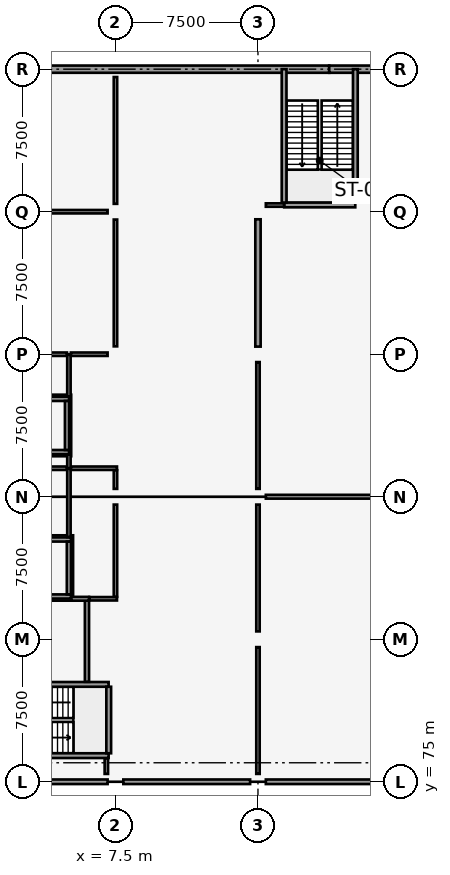
"""IFC4 building model, lengths in metres.
Left out: names, types, materials, properties, quantities, classifications, styles, units other than length and angle.
Written with IfcOpenShell. Run it as: python <this file> out.ifc"""

import sys

from ifc_helpers import new_model, si_unit, direction, frame, frame_2d, origin, origin_2d, place, context, subcontext, project, spatial, rectangle, extrude, element, fill, save


model = new_model("IFC4")
c1 = context("Model", 3, precision=1e-05, world=origin(), true_north=direction((0.0, 1.0)))
c2 = subcontext(c1, "Body", "Model", "MODEL_VIEW")
j1 = project(units=[si_unit("LENGTHUNIT", "METRE"), si_unit("PLANEANGLEUNIT", "RADIAN")], contexts=[c1])
p1 = place(None, origin())
s1 = spatial("IfcSite", under=j1, at=p1, CompositionType="ELEMENT")
p2 = place(p1, origin())
s2 = spatial("IfcBuilding", under=s1, at=p2, CompositionType="ELEMENT")
p3 = place(p2, frame((0.0, 0.0, -4.8)))
s3 = spatial("IfcBuildingStorey", under=s2, at=p3, CompositionType="ELEMENT", Elevation=-4.8)
for number, where, z_axis, x_axis in (
    (1, (7.5, 75.0, 0.0), (0.0, 0.0, 1.0), (1.0, 0.0, 0.0)),
    (2, (7.5, 82.5, 0.0), (0.0, 0.0, 1.0), (1.0, 0.0, 0.0)),
    (3, (7.5, 90.0, 0.0), (0.0, 0.0, 1.0), (1.0, 0.0, 0.0)),
    (4, (7.5, 97.5, 0.0), (0.0, 0.0, 1.0), (1.0, 0.0, 0.0)),
    (5, (7.5, 105.0, 0.0), (0.0, 0.0, 1.0), (1.0, 0.0, 0.0)),
    (6, (7.5, 112.5, 0.0), (0.0, 0.0, 1.0), (1.0, 0.0, 0.0)),
    (7, (15.0, 75.0, 0.0), (0.0, 0.0, 1.0), (1.0, 0.0, 0.0)),
    (8, (15.0, 82.5, 0.0), (0.0, 0.0, 1.0), (1.0, 0.0, 0.0)),
    (9, (15.0, 90.0, 0.0), (0.0, 0.0, 1.0), (1.0, 0.0, 0.0)),
    (10, (15.0, 97.5, 0.0), (0.0, 0.0, 1.0), (1.0, 0.0, 0.0)),
    (11, (15.0, 105.0, 0.0), (0.0, 0.0, 1.0), (1.0, 0.0, 0.0)),
    (12, (15.0, 112.5, 0.0), (0.0, 0.0, 1.0), (1.0, 0.0, 0.0)),
):
    element("IfcColumn", number, at=place(p3, frame(where, z_axis=z_axis, x_axis=x_axis)), inside=s3, PredefinedType="COLUMN", context=c2, shape_type="SweptSolid", body=[
        extrude(rectangle(XDim=0.8, YDim=0.8, at=origin_2d()), origin(), (0.0, 0.0, 1.0), 4.8),
    ])
p4 = place(p3, frame((0.415, 112.5, 0.0), z_axis=(0.0, 0.0, 1.0), x_axis=(1.0, 0.0, 0.0)))
e13 = element("IfcWall", 13, at=p4, inside=s3, PredefinedType="USERDEFINED", context=c2, shape_type="SweptSolid", body=[
    extrude(rectangle(XDim=18.335, YDim=0.38, at=frame_2d((9.167, 0.0))), origin(), (0.0, 0.0, 1.0), 4.5),
])
p5 = place(p3, frame((18.75, 112.5, 0.0), z_axis=(0.0, 0.0, 1.0), x_axis=(1.0, 0.0, 0.0)))
e14 = element("IfcWall", 14, at=p5, inside=s3, PredefinedType="USERDEFINED", context=c2, shape_type="SweptSolid", body=[
    extrude(rectangle(XDim=18.345, YDim=0.38, at=frame_2d((9.172, 0.0))), origin(), (0.0, 0.0, 1.0), 4.5),
])
p6 = place(p3, frame((15.0, 97.9, 0.0), z_axis=(0.0, 0.0, 1.0), x_axis=(0.0, 1.0, 0.0)))
e15 = element("IfcWall", 15, at=p6, inside=s3, PredefinedType="SHEAR", context=c2, shape_type="SweptSolid", body=[
    extrude(rectangle(XDim=6.7, YDim=0.28, at=frame_2d((3.35, 0.0))), origin(), (0.0, 0.0, 1.0), 4.5),
])
p7 = place(p3, frame((-0.12, 76.375, 0.0), z_axis=(0.0, 0.0, 1.0), x_axis=(1.0, 0.0, 0.0)))
e16 = element("IfcWall", 16, at=p7, inside=s3, PredefinedType="SOLIDWALL", context=c2, shape_type="SweptSolid", body=[
    extrude(rectangle(XDim=7.26, YDim=0.25, at=frame_2d((3.63, 0.0))), origin(), (0.0, 0.0, 1.0), 4.5),
])
p8 = place(p3, frame((-0.12, 80.125, 0.0), z_axis=(0.0, 0.0, 1.0), x_axis=(1.0, 0.0, 0.0)))
e17 = element("IfcWall", 17, at=p8, inside=s3, PredefinedType="SOLIDWALL", context=c2, shape_type="SweptSolid", body=[
    extrude(rectangle(XDim=7.26, YDim=0.25, at=frame_2d((3.63, 0.0))), origin(), (0.0, 0.0, 1.0), 4.5),
])
p9 = place(p8, frame((0.45, 0.0, 0.0)))
e18 = element("IfcOpeningElement", 18, at=p9, cuts=e17, PredefinedType="OPENING", context=c2, shape_type="SweptSolid", body=[
    extrude(rectangle(XDim=1.1, YDim=2.15, at=frame_2d((0.55, 1.075))), frame((0.0, 0.135, 0.0), z_axis=(0.0, -1.0, 0.0), x_axis=(1.0, 0.0, 0.0)), (0.0, 0.0, 1.0), 0.27),
])
p10 = place(p3, frame((7.145, 76.5, 0.0), z_axis=(0.0, 0.0, 1.0), x_axis=(0.0, 1.0, 0.0)))
e19 = element("IfcWall", 19, at=p10, inside=s3, PredefinedType="SOLIDWALL", context=c2, shape_type="SweptSolid", body=[
    extrude(rectangle(XDim=3.5, YDim=0.25, at=frame_2d((1.75, 0.0))), origin(), (0.0, 0.0, 1.0), 4.5),
])
p11 = place(p3, frame((16.38, 105.355, 0.0), z_axis=(0.0, 0.0, 1.0), x_axis=(1.0, 0.0, 0.0)))
e20 = element("IfcWall", 20, at=p11, inside=s3, PredefinedType="SOLIDWALL", context=c2, shape_type="SweptSolid", body=[
    extrude(rectangle(XDim=3.74, YDim=0.25, at=frame_2d((1.87, 0.0))), origin(), (0.0, 0.0, 1.0), 4.5),
])
p12 = place(p3, frame((16.375, 105.48, 0.0), z_axis=(0.0, 0.0, 1.0), x_axis=(0.0, 1.0, 0.0)))
e21 = element("IfcWall", 21, at=p12, inside=s3, PredefinedType="SOLIDWALL", context=c2, shape_type="SweptSolid", body=[
    extrude(rectangle(XDim=7.02, YDim=0.25, at=frame_2d((3.51, 0.0))), origin(), (0.0, 0.0, 1.0), 4.5),
])
p13 = place(p12, frame((5.47, 0.0, 0.0)))
e22 = element("IfcOpeningElement", 22, at=p13, cuts=e21, PredefinedType="OPENING", context=c2, shape_type="SweptSolid", body=[
    extrude(rectangle(XDim=1.1, YDim=2.15, at=frame_2d((0.55, 1.075))), frame((0.0, 0.135, 0.0), z_axis=(0.0, -1.0, 0.0), x_axis=(1.0, 0.0, 0.0)), (0.0, 0.0, 1.0), 0.27),
])
p14 = place(p3, frame((20.125, 105.48, 0.0), z_axis=(0.0, 0.0, 1.0), x_axis=(0.0, 1.0, 0.0)))
e23 = element("IfcWall", 23, at=p14, inside=s3, PredefinedType="SOLIDWALL", context=c2, shape_type="SweptSolid", body=[
    extrude(rectangle(XDim=7.02, YDim=0.25, at=frame_2d((3.51, 0.0))), origin(), (0.0, 0.0, 1.0), 4.5),
])
for number, where, z_axis, x_axis in (
    (24, (2.44, 92.35, 0.0), (0.0, 0.0, 1.0), (1.0, 0.0, 0.0)),
    (25, (2.44, 95.15, 0.0), (0.0, 0.0, 1.0), (1.0, 0.0, 0.0)),
):
    element("IfcWall", number, at=place(p3, frame(where, z_axis=z_axis, x_axis=x_axis)), inside=s3, PredefinedType="SOLIDWALL", context=c2, shape_type="SweptSolid", body=[
        extrude(rectangle(XDim=2.62, YDim=0.22, at=frame_2d((1.31, 0.0))), origin(), (0.0, 0.0, 1.0), 4.5),
    ])
p15 = place(p3, frame((4.95, 92.46, 0.0), z_axis=(0.0, 0.0, 1.0), x_axis=(0.0, 1.0, 0.0)))
e26 = element("IfcWall", 26, at=p15, inside=s3, PredefinedType="SOLIDWALL", context=c2, shape_type="SweptSolid", body=[
    extrude(rectangle(XDim=2.58, YDim=0.22, at=frame_2d((1.29, 0.0))), origin(), (0.0, 0.0, 1.0), 4.5),
])
p16 = place(p15, frame((0.79, 0.0, 0.0)))
e27 = element("IfcOpeningElement", 27, at=p16, cuts=e26, PredefinedType="OPENING", context=c2, shape_type="SweptSolid", body=[
    extrude(rectangle(XDim=1.0, YDim=2.15, at=frame_2d((0.5, 1.075))), frame((0.0, 0.12, 0.0), z_axis=(0.0, -1.0, 0.0), x_axis=(1.0, 0.0, 0.0)), (0.0, 0.0, 1.0), 0.24),
])
p17 = place(p3, frame((2.34, 84.75, 0.0), z_axis=(0.0, 0.0, 1.0), x_axis=(1.0, 0.0, 0.0)))
e28 = element("IfcWall", 28, at=p17, inside=s3, PredefinedType="SOLIDWALL", context=c2, shape_type="SweptSolid", body=[
    extrude(rectangle(XDim=2.82, YDim=0.22, at=frame_2d((1.41, 0.0))), origin(), (0.0, 0.0, 1.0), 4.5),
])
p18 = place(p17, frame((0.86, 0.0, 0.0)))
e29 = element("IfcOpeningElement", 29, at=p18, cuts=e28, PredefinedType="OPENING", context=c2, shape_type="SweptSolid", body=[
    extrude(rectangle(XDim=1.1, YDim=2.15, at=frame_2d((0.55, 1.075))), frame((0.0, 0.12, 0.0), z_axis=(0.0, -1.0, 0.0), x_axis=(1.0, 0.0, 0.0)), (0.0, 0.0, 1.0), 0.24),
])
p19 = place(p3, frame((2.34, 87.75, 0.0), z_axis=(0.0, 0.0, 1.0), x_axis=(1.0, 0.0, 0.0)))
e30 = element("IfcWall", 30, at=p19, inside=s3, PredefinedType="SOLIDWALL", context=c2, shape_type="SweptSolid", body=[
    extrude(rectangle(XDim=2.82, YDim=0.22, at=frame_2d((1.41, 0.0))), origin(), (0.0, 0.0, 1.0), 4.5),
])
p20 = place(p3, frame((5.05, 84.86, 0.0), z_axis=(0.0, 0.0, 1.0), x_axis=(0.0, 1.0, 0.0)))
e31 = element("IfcWall", 31, at=p20, inside=s3, PredefinedType="SOLIDWALL", context=c2, shape_type="SweptSolid", body=[
    extrude(rectangle(XDim=2.78, YDim=0.22, at=frame_2d((1.39, 0.0))), origin(), (0.0, 0.0, 1.0), 4.5),
])
p21 = place(p3, frame((6.0, 80.26, 0.0), z_axis=(0.0, 0.0, 1.0), x_axis=(0.0, 1.0, 0.0)))
e32 = element("IfcWall", 32, at=p21, inside=s3, PredefinedType="SOLIDWALL", context=c2, shape_type="SweptSolid", body=[
    extrude(rectangle(XDim=4.37, YDim=0.22, at=frame_2d((2.185, 0.0))), origin(), (0.0, 0.0, 1.0), 4.5),
])
p22 = place(p21, frame((0.45, 0.0, 0.0)))
e33 = element("IfcOpeningElement", 33, at=p22, cuts=e32, PredefinedType="OPENING", context=c2, shape_type="SweptSolid", body=[
    extrude(rectangle(XDim=1.1, YDim=2.15, at=frame_2d((0.55, 1.075))), frame((0.0, 0.12, 0.0), z_axis=(0.0, -1.0, 0.0), x_axis=(1.0, 0.0, 0.0)), (0.0, 0.0, 1.0), 0.24),
])
p23 = place(p3, frame((5.175, 84.63, 0.0), z_axis=(0.0, 0.0, 1.0), x_axis=(1.0, 0.0, 0.0)))
e34 = element("IfcWall", 34, at=p23, inside=s3, PredefinedType="PARTITIONING", context=c2, shape_type="SweptSolid", body=[
    extrude(rectangle(XDim=0.935, YDim=0.2, at=frame_2d((0.468, 0.0))), origin(), (0.0, 0.0, 1.0), 4.48),
])
for number, where, z_axis, x_axis in (
    (35, (0.414, 75.0, 0.0), (0.0, 0.0, 1.0), (1.0, 0.0, 0.0)),
    (36, (7.914, 75.0, 0.0), (0.0, 0.0, 1.0), (1.0, 0.0, 0.0)),
    (37, (15.414, 75.0, 0.0), (0.0, 0.0, 1.0), (1.0, 0.0, 0.0)),
):
    element("IfcWall", number, at=place(p3, frame(where, z_axis=z_axis, x_axis=x_axis)), inside=s3, PredefinedType="PARTITIONING", context=c2, shape_type="SweptSolid", body=[
        extrude(rectangle(XDim=6.672, YDim=0.24, at=frame_2d((3.336, 0.0))), origin(), (0.0, 0.0, 1.0), 3.82),
    ])
p24 = place(p3, frame((7.02, 75.414, 0.0), z_axis=(0.0, 0.0, 1.0), x_axis=(0.0, 1.0, 0.0)))
e38 = element("IfcWall", 38, at=p24, inside=s3, PredefinedType="PARTITIONING", context=c2, shape_type="SweptSolid", body=[
    extrude(rectangle(XDim=0.822, YDim=0.18, at=frame_2d((0.411, 0.0))), origin(), (0.0, 0.0, 1.0), 3.82),
])
p25 = place(p3, frame((5.05, 87.874, 0.0), z_axis=(0.0, 0.0, 1.0), x_axis=(0.0, 1.0, 0.0)))
e39 = element("IfcWall", 39, at=p25, inside=s3, PredefinedType="PARTITIONING", context=c2, shape_type="SweptSolid", body=[
    extrude(rectangle(XDim=3.626, YDim=0.18, at=frame_2d((1.813, 0.0))), origin(), (0.0, 0.0, 1.0), 3.57),
])
p26 = place(p3, frame((6.124, 84.63, 0.0), z_axis=(0.0, 0.0, 1.0), x_axis=(1.0, 0.0, 0.0)))
e40 = element("IfcWall", 40, at=p26, inside=s3, PredefinedType="PARTITIONING", context=c2, shape_type="SweptSolid", body=[
    extrude(rectangle(XDim=1.456, YDim=0.18, at=frame_2d((0.728, 0.0))), origin(), (0.0, 0.0, 1.0), 3.87),
])
p27 = place(p3, frame((0.239, 91.5, 0.0), z_axis=(0.0, 0.0, 1.0), x_axis=(1.0, 0.0, 0.0)))
e41 = element("IfcWall", 41, at=p27, inside=s3, PredefinedType="PARTITIONING", context=c2, shape_type="SweptSolid", body=[
    extrude(rectangle(XDim=4.707, YDim=0.18, at=frame_2d((2.354, 0.0))), origin(), (0.0, 0.0, 1.0), 3.87),
])
p28 = place(p3, frame((5.154, 91.5, 0.0), z_axis=(0.0, 0.0, 1.0), x_axis=(1.0, 0.0, 0.0)))
e42 = element("IfcWall", 42, at=p28, inside=s3, PredefinedType="PARTITIONING", context=c2, shape_type="SweptSolid", body=[
    extrude(rectangle(XDim=2.426, YDim=0.18, at=frame_2d((1.213, 0.0))), origin(), (0.0, 0.0, 1.0), 3.77),
])
p29 = place(p3, frame((7.5, 84.734, 0.0), z_axis=(0.0, 0.0, 1.0), x_axis=(0.0, 1.0, 0.0)))
e43 = element("IfcWall", 43, at=p29, inside=s3, PredefinedType="PARTITIONING", context=c2, shape_type="SweptSolid", body=[
    extrude(rectangle(XDim=4.852, YDim=0.18, at=frame_2d((2.426, 0.0))), origin(), (0.0, 0.0, 1.0), 3.52),
])
p30 = place(p29, frame((2.241, 0.0, 0.0)))
e44 = element("IfcOpeningElement", 44, at=p30, cuts=e43, PredefinedType="OPENING", context=c2, shape_type="SweptSolid", body=[
    extrude(rectangle(XDim=1.05, YDim=2.12, at=frame_2d((0.525, 1.06))), frame((0.0, 0.1, 0.0), z_axis=(0.0, -1.0, 0.0), x_axis=(1.0, 0.0, 0.0)), (0.0, 0.0, 1.0), 0.2),
])
p31 = place(p3, frame((7.5, 90.414, 0.0), z_axis=(0.0, 0.0, 1.0), x_axis=(0.0, 1.0, 0.0)))
e45 = element("IfcWall", 45, at=p31, inside=s3, PredefinedType="PARTITIONING", context=c2, shape_type="SweptSolid", body=[
    extrude(rectangle(XDim=0.982, YDim=0.18, at=frame_2d((0.491, 0.0))), origin(), (0.0, 0.0, 1.0), 3.52),
])
p32 = place(p3, frame((5.05, 91.5, 0.0), z_axis=(0.0, 0.0, 1.0), x_axis=(0.0, 1.0, 0.0)))
e46 = element("IfcWall", 46, at=p32, inside=s3, PredefinedType="PARTITIONING", context=c2, shape_type="SweptSolid", body=[
    extrude(rectangle(XDim=0.726, YDim=0.18, at=frame_2d((0.363, 0.0))), origin(), (0.0, 0.0, 1.0), 3.87),
])
p33 = place(p3, frame((5.05, 95.274, 0.0), z_axis=(0.0, 0.0, 1.0), x_axis=(0.0, 1.0, 0.0)))
e47 = element("IfcWall", 47, at=p33, inside=s3, PredefinedType="PARTITIONING", context=c2, shape_type="SweptSolid", body=[
    extrude(rectangle(XDim=2.226, YDim=0.18, at=frame_2d((1.113, 0.0))), origin(), (0.0, 0.0, 1.0), 3.57),
])
p34 = place(p3, frame((0.414, 97.5, 0.0), z_axis=(0.0, 0.0, 1.0), x_axis=(1.0, 0.0, 0.0)))
e48 = element("IfcWall", 48, at=p34, inside=s3, PredefinedType="PARTITIONING", context=c2, shape_type="SweptSolid", body=[
    extrude(rectangle(XDim=4.532, YDim=0.18, at=frame_2d((2.266, 0.0))), origin(), (0.0, 0.0, 1.0), 3.57),
])
p35 = place(p3, frame((5.154, 97.5, 0.0), z_axis=(0.0, 0.0, 1.0), x_axis=(1.0, 0.0, 0.0)))
e49 = element("IfcWall", 49, at=p35, inside=s3, PredefinedType="PARTITIONING", context=c2, shape_type="SweptSolid", body=[
    extrude(rectangle(XDim=1.932, YDim=0.18, at=frame_2d((0.966, 0.0))), origin(), (0.0, 0.0, 1.0), 3.52),
])
p36 = place(p3, frame((0.414, 105.0, 0.0), z_axis=(0.0, 0.0, 1.0), x_axis=(1.0, 0.0, 0.0)))
e50 = element("IfcWall", 50, at=p36, inside=s3, PredefinedType="PARTITIONING", context=c2, shape_type="SweptSolid", body=[
    extrude(rectangle(XDim=6.672, YDim=0.18, at=frame_2d((3.336, 0.0))), origin(), (0.0, 0.0, 1.0), 3.52),
])
p37 = place(p3, frame((7.5, 97.914, 0.0), z_axis=(0.0, 0.0, 1.0), x_axis=(0.0, 1.0, 0.0)))
e51 = element("IfcWall", 51, at=p37, inside=s3, PredefinedType="PARTITIONING", context=c2, shape_type="SweptSolid", body=[
    extrude(rectangle(XDim=6.672, YDim=0.18, at=frame_2d((3.336, 0.0))), origin(), (0.0, 0.0, 1.0), 3.52),
])
p38 = place(p37, frame((2.836, 0.0, 0.0)))
e52 = element("IfcOpeningElement", 52, at=p38, cuts=e51, PredefinedType="OPENING", context=c2, shape_type="SweptSolid", body=[
    extrude(rectangle(XDim=1.0, YDim=2.12, at=frame_2d((0.5, 1.06))), frame((0.0, 0.1, 0.0), z_axis=(0.0, -1.0, 0.0), x_axis=(1.0, 0.0, 0.0)), (0.0, 0.0, 1.0), 0.2),
])
p39 = place(p3, frame((7.5, 105.414, 0.0), z_axis=(0.0, 0.0, 1.0), x_axis=(0.0, 1.0, 0.0)))
e53 = element("IfcWall", 53, at=p39, inside=s3, PredefinedType="PARTITIONING", context=c2, shape_type="SweptSolid", body=[
    extrude(rectangle(XDim=6.672, YDim=0.18, at=frame_2d((3.336, 0.0))), origin(), (0.0, 0.0, 1.0), 3.52),
])
p40 = place(p39, frame((2.836, 0.0, 0.0)))
e54 = element("IfcOpeningElement", 54, at=p40, cuts=e53, PredefinedType="OPENING", context=c2, shape_type="SweptSolid", body=[
    extrude(rectangle(XDim=1.0, YDim=2.12, at=frame_2d((0.5, 1.06))), frame((0.0, 0.1, 0.0), z_axis=(0.0, -1.0, 0.0), x_axis=(1.0, 0.0, 0.0)), (0.0, 0.0, 1.0), 0.2),
])
p41 = place(p3, frame((15.414, 105.35, 0.0), z_axis=(0.0, 0.0, 1.0), x_axis=(1.0, 0.0, 0.0)))
e55 = element("IfcWall", 55, at=p41, inside=s3, PredefinedType="PARTITIONING", context=c2, shape_type="SweptSolid", body=[
    extrude(rectangle(XDim=0.966, YDim=0.18, at=frame_2d((0.483, 0.0))), origin(), (0.0, 0.0, 1.0), 3.52),
])
p42 = place(p3, frame((15.414, 90.0, 0.0), z_axis=(0.0, 0.0, 1.0), x_axis=(1.0, 0.0, 0.0)))
e56 = element("IfcWall", 56, at=p42, inside=s3, PredefinedType="PARTITIONING", context=c2, shape_type="SweptSolid", body=[
    extrude(rectangle(XDim=6.672, YDim=0.2, at=frame_2d((3.336, 0.0))), origin(), (0.0, 0.0, 1.0), 3.52),
])
p43 = place(p3, frame((15.0, 75.414, 0.0), z_axis=(0.0, 0.0, 1.0), x_axis=(0.0, 1.0, 0.0)))
e57 = element("IfcWall", 57, at=p43, inside=s3, PredefinedType="PARTITIONING", context=c2, shape_type="SweptSolid", body=[
    extrude(rectangle(XDim=6.672, YDim=0.18, at=frame_2d((3.336, 0.0))), origin(), (0.0, 0.0, 1.0), 3.52),
])
p44 = place(p43, frame((2.536, 0.0, 0.0)))
e58 = element("IfcOpeningElement", 58, at=p44, cuts=e57, PredefinedType="OPENING", context=c2, shape_type="SweptSolid", body=[
    extrude(rectangle(XDim=1.6, YDim=2.15, at=frame_2d((0.8, 1.075))), frame((0.0, 0.1, 0.0), z_axis=(0.0, -1.0, 0.0), x_axis=(1.0, 0.0, 0.0)), (0.0, 0.0, 1.0), 0.2),
])
p45 = place(p3, frame((15.0, 82.914, 0.0), z_axis=(0.0, 0.0, 1.0), x_axis=(0.0, 1.0, 0.0)))
e59 = element("IfcWall", 59, at=p45, inside=s3, PredefinedType="PARTITIONING", context=c2, shape_type="SweptSolid", body=[
    extrude(rectangle(XDim=6.672, YDim=0.18, at=frame_2d((3.336, 0.0))), origin(), (0.0, 0.0, 1.0), 3.52),
])
p46 = place(p45, frame((2.536, 0.0, 0.0)))
e60 = element("IfcOpeningElement", 60, at=p46, cuts=e59, PredefinedType="OPENING", context=c2, shape_type="SweptSolid", body=[
    extrude(rectangle(XDim=1.6, YDim=2.15, at=frame_2d((0.8, 1.075))), frame((0.0, 0.1, 0.0), z_axis=(0.0, -1.0, 0.0), x_axis=(1.0, 0.0, 0.0)), (0.0, 0.0, 1.0), 0.2),
])
p47 = place(p3, frame((15.0, 90.414, 0.0), z_axis=(0.0, 0.0, 1.0), x_axis=(0.0, 1.0, 0.0)))
e61 = element("IfcWall", 61, at=p47, inside=s3, PredefinedType="PARTITIONING", context=c2, shape_type="SweptSolid", body=[
    extrude(rectangle(XDim=6.672, YDim=0.18, at=frame_2d((3.336, 0.0))), origin(), (0.0, 0.0, 1.0), 3.52),
])
p48 = place(p47, frame((2.736, 0.0, 0.0)))
e62 = element("IfcOpeningElement", 62, at=p48, cuts=e61, PredefinedType="OPENING", context=c2, shape_type="SweptSolid", body=[
    extrude(rectangle(XDim=1.2, YDim=2.15, at=frame_2d((0.6, 1.075))), frame((0.0, 0.1, 0.0), z_axis=(0.0, -1.0, 0.0), x_axis=(1.0, 0.0, 0.0)), (0.0, 0.0, 1.0), 0.2),
])
p49 = place(p13, origin())
e63 = element("IfcDoor", 63, at=p49, inside=s3, OperationType="SINGLE_SWING_RIGHT", PredefinedType="DOOR", context=c2, shape_type="SweptSolid", body=[
    extrude(rectangle(XDim=1.1, YDim=2.15, at=frame_2d((0.55, 1.075))), frame((0.0, 0.025, 0.0), z_axis=(0.0, -1.0, 0.0), x_axis=(1.0, 0.0, 0.0)), (0.0, 0.0, 1.0), 0.05),
])
fill(e22, e63)
p50 = place(p16, origin())
e64 = element("IfcDoor", 64, at=p50, inside=s3, OperationType="SLIDING_TO_LEFT", PredefinedType="DOOR", context=c2, shape_type="SweptSolid", body=[
    extrude(rectangle(XDim=1.0, YDim=2.15, at=frame_2d((0.5, 1.075))), frame((0.0, 0.025, 0.0), z_axis=(0.0, -1.0, 0.0), x_axis=(1.0, 0.0, 0.0)), (0.0, 0.0, 1.0), 0.05),
])
fill(e27, e64)
p51 = place(p18, origin())
e65 = element("IfcDoor", 65, at=p51, inside=s3, OperationType="SLIDING_TO_LEFT", PredefinedType="DOOR", context=c2, shape_type="SweptSolid", body=[
    extrude(rectangle(XDim=1.1, YDim=2.15, at=frame_2d((0.55, 1.075))), frame((0.0, 0.025, 0.0), z_axis=(0.0, -1.0, 0.0), x_axis=(1.0, 0.0, 0.0)), (0.0, 0.0, 1.0), 0.05),
])
fill(e29, e65)
p52 = place(p22, origin())
e66 = element("IfcDoor", 66, at=p52, inside=s3, OperationType="SINGLE_SWING_RIGHT", PredefinedType="DOOR", context=c2, shape_type="SweptSolid", body=[
    extrude(rectangle(XDim=1.1, YDim=2.15, at=frame_2d((0.55, 1.075))), frame((0.0, 0.025, 0.0), z_axis=(0.0, -1.0, 0.0), x_axis=(1.0, 0.0, 0.0)), (0.0, 0.0, 1.0), 0.05),
])
fill(e33, e66)
p53 = place(p30, origin())
e67 = element("IfcDoor", 67, at=p53, inside=s3, OperationType="SINGLE_SWING_RIGHT", PredefinedType="DOOR", context=c2, shape_type="SweptSolid", body=[
    extrude(rectangle(XDim=1.05, YDim=2.12, at=frame_2d((0.525, 1.06))), frame((0.0, 0.025, 0.0), z_axis=(0.0, -1.0, 0.0), x_axis=(1.0, 0.0, 0.0)), (0.0, 0.0, 1.0), 0.05),
])
fill(e44, e67)
p54 = place(p38, origin())
e68 = element("IfcDoor", 68, at=p54, inside=s3, OperationType="SINGLE_SWING_LEFT", PredefinedType="DOOR", context=c2, shape_type="SweptSolid", body=[
    extrude(rectangle(XDim=1.0, YDim=2.12, at=frame_2d((0.5, 1.06))), frame((0.0, 0.025, 0.0), z_axis=(0.0, -1.0, 0.0), x_axis=(1.0, 0.0, 0.0)), (0.0, 0.0, 1.0), 0.05),
])
fill(e52, e68)
p55 = place(p40, origin())
e69 = element("IfcDoor", 69, at=p55, inside=s3, OperationType="SINGLE_SWING_RIGHT", PredefinedType="DOOR", context=c2, shape_type="SweptSolid", body=[
    extrude(rectangle(XDim=1.0, YDim=2.12, at=frame_2d((0.5, 1.06))), frame((0.0, 0.025, 0.0), z_axis=(0.0, -1.0, 0.0), x_axis=(1.0, 0.0, 0.0)), (0.0, 0.0, 1.0), 0.05),
])
fill(e54, e69)
p56 = place(p44, origin())
e70 = element("IfcDoor", 70, at=p56, inside=s3, OperationType="SINGLE_SWING_LEFT", PredefinedType="DOOR", context=c2, shape_type="SweptSolid", body=[
    extrude(rectangle(XDim=1.6, YDim=2.15, at=frame_2d((0.8, 1.075))), frame((0.0, 0.025, 0.0), z_axis=(0.0, -1.0, 0.0), x_axis=(1.0, 0.0, 0.0)), (0.0, 0.0, 1.0), 0.05),
])
fill(e58, e70)
p57 = place(p46, origin())
e71 = element("IfcDoor", 71, at=p57, inside=s3, OperationType="SINGLE_SWING_RIGHT", PredefinedType="DOOR", context=c2, shape_type="SweptSolid", body=[
    extrude(rectangle(XDim=1.6, YDim=2.15, at=frame_2d((0.8, 1.075))), frame((0.0, 0.025, 0.0), z_axis=(0.0, -1.0, 0.0), x_axis=(1.0, 0.0, 0.0)), (0.0, 0.0, 1.0), 0.05),
])
fill(e60, e71)
p58 = place(p48, origin())
e72 = element("IfcDoor", 72, at=p58, inside=s3, OperationType="SINGLE_SWING_LEFT", PredefinedType="DOOR", context=c2, shape_type="SweptSolid", body=[
    extrude(rectangle(XDim=1.2, YDim=2.15, at=frame_2d((0.6, 1.075))), frame((0.0, 0.025, 0.0), z_axis=(0.0, -1.0, 0.0), x_axis=(1.0, 0.0, 0.0)), (0.0, 0.0, 1.0), 0.05),
])
fill(e62, e72)
save(model, sys.argv[1])
